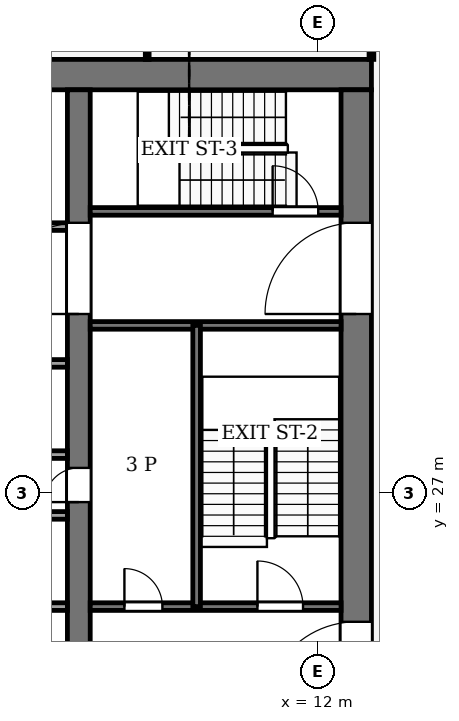
"""IFC4 building model, lengths in metres.
Left out: names, types, materials, properties, quantities, classifications, styles, units other than length and angle.
Written with IfcOpenShell. Run it as: python <this file> out.ifc"""

import sys

from ifc_helpers import new_model, si_unit, direction, frame, frame_2d, origin, place, context, subcontext, project, spatial, rectangle, extrude, element, fill, save


model = new_model("IFC4")
c1 = context("Model", 3, precision=1e-05, world=origin(), true_north=direction((0.0, 1.0)))
c2 = subcontext(c1, "Body", "Model", "MODEL_VIEW")
j1 = project(units=[si_unit("LENGTHUNIT", "METRE"), si_unit("PLANEANGLEUNIT", "RADIAN")], contexts=[c1])
p1 = place(None, origin())
s1 = spatial("IfcSite", under=j1, at=p1, CompositionType="ELEMENT")
p2 = place(p1, origin())
s2 = spatial("IfcBuilding", under=s1, at=p2, CompositionType="ELEMENT")
p3 = place(p2, frame((0.0, 0.0, 258.0)))
s3 = spatial("IfcBuildingStorey", under=s2, at=p3, CompositionType="ELEMENT", Elevation=258.0)
p4 = place(p3, frame((-13.4, 38.0, -0.13), z_axis=(0.0, 0.0, 1.0), x_axis=(1.0, 0.0, 0.0)))
e1 = element("IfcWall", 1, at=p4, inside=s3, PredefinedType="SHEAR", context=c2, shape_type="SweptSolid", body=[
    extrude(rectangle(XDim=26.8, YDim=0.8, at=frame_2d((13.4, 0.0))), origin(), (0.0, 0.0, 1.0), 4.0),
])
p5 = place(p3, frame((13.0, 18.4, -0.13), z_axis=(0.0, 0.0, 1.0), x_axis=(0.0, 1.0, 0.0)))
e2 = element("IfcWall", 2, at=p5, inside=s3, PredefinedType="SHEAR", context=c2, shape_type="SweptSolid", body=[
    extrude(rectangle(XDim=19.2, YDim=0.8, at=frame_2d((9.6, 0.0))), origin(), (0.0, 0.0, 1.0), 4.0),
])
p6 = place(p5, frame((2.8, 0.0, 0.13)))
e3 = element("IfcOpeningElement", 3, at=p6, cuts=e2, PredefinedType="OPENING", context=c2, shape_type="SweptSolid", body=[
    extrude(rectangle(XDim=2.4, YDim=2.4, at=frame_2d((1.2, 1.2))), frame((0.0, 0.41, 0.0), z_axis=(0.0, -1.0, 0.0), x_axis=(1.0, 0.0, 0.0)), (0.0, 0.0, 1.0), 0.82),
])
p7 = place(p5, frame((13.3, 0.0, 0.13)))
e4 = element("IfcOpeningElement", 4, at=p7, cuts=e2, PredefinedType="OPENING", context=c2, shape_type="SweptSolid", body=[
    extrude(rectangle(XDim=2.4, YDim=2.4, at=frame_2d((1.2, 1.2))), frame((0.0, 0.41, 0.0), z_axis=(0.0, -1.0, 0.0), x_axis=(1.0, 0.0, 0.0)), (0.0, 0.0, 1.0), 0.82),
])
p8 = place(p3, frame((5.7, 18.4, -0.13), z_axis=(0.0, 0.0, 1.0), x_axis=(0.0, 1.0, 0.0)))
e5 = element("IfcWall", 5, at=p8, inside=s3, PredefinedType="SHEAR", context=c2, shape_type="SweptSolid", body=[
    extrude(rectangle(XDim=19.2, YDim=0.6, at=frame_2d((9.6, 0.0))), origin(), (0.0, 0.0, 1.0), 4.0),
])
p9 = place(p8, frame((8.35, 0.0, 0.13)))
e6 = element("IfcOpeningElement", 6, at=p9, cuts=e5, PredefinedType="OPENING", context=c2, shape_type="SweptSolid", body=[
    extrude(rectangle(XDim=0.9, YDim=2.1, at=frame_2d((0.45, 1.05))), frame((0.0, 0.31, 0.0), z_axis=(0.0, -1.0, 0.0), x_axis=(1.0, 0.0, 0.0)), (0.0, 0.0, 1.0), 0.62),
])
p10 = place(p8, frame((13.3, 0.0, 0.13)))
e7 = element("IfcOpeningElement", 7, at=p10, cuts=e5, PredefinedType="OPENING", context=c2, shape_type="SweptSolid", body=[
    extrude(rectangle(XDim=2.4, YDim=2.4, at=frame_2d((1.2, 1.2))), frame((0.0, 0.31, 0.0), z_axis=(0.0, -1.0, 0.0), x_axis=(1.0, 0.0, 0.0)), (0.0, 0.0, 1.0), 0.62),
])
p11 = place(p3, frame((-5.4, 24.0, 0.0), z_axis=(0.0, 0.0, 1.0), x_axis=(1.0, 0.0, 0.0)))
e8 = element("IfcWall", 8, at=p11, inside=s3, PredefinedType="PARTITIONING", context=c2, shape_type="SweptSolid", body=[
    extrude(rectangle(XDim=10.8, YDim=0.2, at=frame_2d((5.4, 0.0))), origin(), (0.0, 0.0, 1.0), 3.87),
])
p12 = place(p11, frame((0.75, 0.0, 0.0)))
e9 = element("IfcOpeningElement", 9, at=p12, cuts=e8, PredefinedType="OPENING", context=c2, shape_type="SweptSolid", body=[
    extrude(rectangle(XDim=1.2, YDim=2.2, at=frame_2d((0.6, 1.1))), frame((0.0, 0.11, 0.0), z_axis=(0.0, -1.0, 0.0), x_axis=(1.0, 0.0, 0.0)), (0.0, 0.0, 1.0), 0.22),
])
p13 = place(p11, frame((3.45, 0.0, 0.0)))
e10 = element("IfcOpeningElement", 10, at=p13, cuts=e8, PredefinedType="OPENING", context=c2, shape_type="SweptSolid", body=[
    extrude(rectangle(XDim=1.2, YDim=2.2, at=frame_2d((0.6, 1.1))), frame((0.0, 0.11, 0.0), z_axis=(0.0, -1.0, 0.0), x_axis=(1.0, 0.0, 0.0)), (0.0, 0.0, 1.0), 0.22),
])
p14 = place(p11, frame((6.15, 0.0, 0.0)))
e11 = element("IfcOpeningElement", 11, at=p14, cuts=e8, PredefinedType="OPENING", context=c2, shape_type="SweptSolid", body=[
    extrude(rectangle(XDim=1.2, YDim=2.2, at=frame_2d((0.6, 1.1))), frame((0.0, 0.11, 0.0), z_axis=(0.0, -1.0, 0.0), x_axis=(1.0, 0.0, 0.0)), (0.0, 0.0, 1.0), 0.22),
])
p15 = place(p11, frame((8.85, 0.0, 0.0)))
e12 = element("IfcOpeningElement", 12, at=p15, cuts=e8, PredefinedType="OPENING", context=c2, shape_type="SweptSolid", body=[
    extrude(rectangle(XDim=1.2, YDim=2.2, at=frame_2d((0.6, 1.1))), frame((0.0, 0.11, 0.0), z_axis=(0.0, -1.0, 0.0), x_axis=(1.0, 0.0, 0.0)), (0.0, 0.0, 1.0), 0.22),
])
p16 = place(p3, frame((6.0, 24.0, 0.0), z_axis=(0.0, 0.0, 1.0), x_axis=(1.0, 0.0, 0.0)))
e13 = element("IfcWall", 13, at=p16, inside=s3, PredefinedType="PARTITIONING", context=c2, shape_type="SweptSolid", body=[
    extrude(rectangle(XDim=6.6, YDim=0.2, at=frame_2d((3.3, 0.0))), origin(), (0.0, 0.0, 1.0), 3.87),
])
p17 = place(p16, frame((0.9, 0.0, 0.0)))
e14 = element("IfcOpeningElement", 14, at=p17, cuts=e13, PredefinedType="OPENING", context=c2, shape_type="SweptSolid", body=[
    extrude(rectangle(XDim=1.0, YDim=2.1, at=frame_2d((0.5, 1.05))), frame((0.0, 0.11, 0.0), z_axis=(0.0, -1.0, 0.0), x_axis=(1.0, 0.0, 0.0)), (0.0, 0.0, 1.0), 0.22),
])
p18 = place(p16, frame((4.4, 0.0, 0.0)))
e15 = element("IfcOpeningElement", 15, at=p18, cuts=e13, PredefinedType="OPENING", context=c2, shape_type="SweptSolid", body=[
    extrude(rectangle(XDim=1.2, YDim=2.2, at=frame_2d((0.6, 1.1))), frame((0.0, 0.11, 0.0), z_axis=(0.0, -1.0, 0.0), x_axis=(1.0, 0.0, 0.0)), (0.0, 0.0, 1.0), 0.22),
])
for number, where, z_axis, x_axis in (
    (16, (-5.4, 26.4, 0.0), (0.0, 0.0, 1.0), (1.0, 0.0, 0.0)),
    (17, (-5.4, 28.0, 0.0), (0.0, 0.0, 1.0), (1.0, 0.0, 0.0)),
):
    element("IfcWall", number, at=place(p3, frame(where, z_axis=z_axis, x_axis=x_axis)), inside=s3, PredefinedType="PARTITIONING", context=c2, shape_type="SweptSolid", body=[
        extrude(rectangle(XDim=10.8, YDim=0.2, at=frame_2d((5.4, 0.0))), origin(), (0.0, 0.0, 1.0), 3.87),
    ])
p19 = place(p3, frame((-5.4, 30.4, 0.0), z_axis=(0.0, 0.0, 1.0), x_axis=(1.0, 0.0, 0.0)))
e18 = element("IfcWall", 18, at=p19, inside=s3, PredefinedType="PARTITIONING", context=c2, shape_type="SweptSolid", body=[
    extrude(rectangle(XDim=10.8, YDim=0.2, at=frame_2d((5.4, 0.0))), origin(), (0.0, 0.0, 1.0), 3.87),
])
p20 = place(p19, frame((3.064, 0.0, 0.0)))
e19 = element("IfcOpeningElement", 19, at=p20, cuts=e18, PredefinedType="OPENING", context=c2, shape_type="SweptSolid", body=[
    extrude(rectangle(XDim=1.0, YDim=2.1, at=frame_2d((0.5, 1.05))), frame((0.0, 0.11, 0.0), z_axis=(0.0, -1.0, 0.0), x_axis=(1.0, 0.0, 0.0)), (0.0, 0.0, 1.0), 0.22),
])
p21 = place(p19, frame((8.464, 0.0, 0.0)))
e20 = element("IfcOpeningElement", 20, at=p21, cuts=e18, PredefinedType="OPENING", context=c2, shape_type="SweptSolid", body=[
    extrude(rectangle(XDim=1.0, YDim=2.1, at=frame_2d((0.5, 1.05))), frame((0.0, 0.11, 0.0), z_axis=(0.0, -1.0, 0.0), x_axis=(1.0, 0.0, 0.0)), (0.0, 0.0, 1.0), 0.22),
])
p22 = place(p3, frame((6.0, 31.4, 0.0), z_axis=(0.0, 0.0, 1.0), x_axis=(1.0, 0.0, 0.0)))
e21 = element("IfcWall", 21, at=p22, inside=s3, PredefinedType="PARTITIONING", context=c2, shape_type="SweptSolid", body=[
    extrude(rectangle(XDim=6.6, YDim=0.2, at=frame_2d((3.3, 0.0))), origin(), (0.0, 0.0, 1.0), 3.87),
])
p23 = place(p3, frame((-5.4, 34.0, 0.0), z_axis=(0.0, 0.0, 1.0), x_axis=(1.0, 0.0, 0.0)))
e22 = element("IfcWall", 22, at=p23, inside=s3, PredefinedType="PARTITIONING", context=c2, shape_type="SweptSolid", body=[
    extrude(rectangle(XDim=10.8, YDim=0.2, at=frame_2d((5.4, 0.0))), origin(), (0.0, 0.0, 1.0), 3.87),
])
p24 = place(p23, frame((6.15, 0.0, 0.0)))
e23 = element("IfcOpeningElement", 23, at=p24, cuts=e22, PredefinedType="OPENING", context=c2, shape_type="SweptSolid", body=[
    extrude(rectangle(XDim=1.2, YDim=2.2, at=frame_2d((0.6, 1.1))), frame((0.0, 0.11, 0.0), z_axis=(0.0, -1.0, 0.0), x_axis=(1.0, 0.0, 0.0)), (0.0, 0.0, 1.0), 0.22),
])
p25 = place(p23, frame((8.95, 0.0, 0.0)))
e24 = element("IfcOpeningElement", 24, at=p25, cuts=e22, PredefinedType="OPENING", context=c2, shape_type="SweptSolid", body=[
    extrude(rectangle(XDim=1.0, YDim=2.1, at=frame_2d((0.5, 1.05))), frame((0.0, 0.11, 0.0), z_axis=(0.0, -1.0, 0.0), x_axis=(1.0, 0.0, 0.0)), (0.0, 0.0, 1.0), 0.22),
])
p26 = place(p3, frame((6.0, 34.4, 0.0), z_axis=(0.0, 0.0, 1.0), x_axis=(1.0, 0.0, 0.0)))
e25 = element("IfcWall", 25, at=p26, inside=s3, PredefinedType="PARTITIONING", context=c2, shape_type="SweptSolid", body=[
    extrude(rectangle(XDim=6.6, YDim=0.2, at=frame_2d((3.3, 0.0))), origin(), (0.0, 0.0, 1.0), 3.87),
])
p27 = place(p26, frame((4.8, 0.0, 0.0)))
e26 = element("IfcOpeningElement", 26, at=p27, cuts=e25, PredefinedType="OPENING", context=c2, shape_type="SweptSolid", body=[
    extrude(rectangle(XDim=1.2, YDim=2.2, at=frame_2d((0.6, 1.1))), frame((0.0, 0.11, 0.0), z_axis=(0.0, -1.0, 0.0), x_axis=(1.0, 0.0, 0.0)), (0.0, 0.0, 1.0), 0.22),
])
p28 = place(p3, frame((8.8, 24.0, 0.0), z_axis=(0.0, 0.0, 1.0), x_axis=(0.0, 1.0, 0.0)))
e27 = element("IfcWall", 27, at=p28, inside=s3, PredefinedType="PARTITIONING", context=c2, shape_type="SweptSolid", body=[
    extrude(rectangle(XDim=7.4, YDim=0.2, at=frame_2d((3.7, 0.0))), origin(), (0.0, 0.0, 1.0), 3.87),
])
p29 = place(p3, frame((13.4, 38.4, 0.0), z_axis=(0.0, 0.0, 1.0), x_axis=(0.0, 1.0, 0.0)))
e28 = element("IfcWall", 28, at=p29, inside=s3, PredefinedType="PARTITIONING", context=c2, shape_type="SweptSolid", body=[
    extrude(rectangle(XDim=5.1, YDim=0.125, at=frame_2d((2.55, 0.0))), origin(), (0.0, 0.0, 1.0), 3.14),
])
p30 = place(p29, frame((2.05, 0.0, 0.0)))
e29 = element("IfcOpeningElement", 29, at=p30, cuts=e28, PredefinedType="OPENING", context=c2, shape_type="SweptSolid", body=[
    extrude(rectangle(XDim=1.0, YDim=2.1, at=frame_2d((0.5, 1.05))), frame((0.0, 0.073, 0.0), z_axis=(0.0, -1.0, 0.0), x_axis=(1.0, 0.0, 0.0)), (0.0, 0.0, 1.0), 0.145),
])
p31 = place(p3, frame((7.5, 43.504, 0.0), z_axis=(0.0, 0.0, 1.0), x_axis=(0.0, -1.0, 0.0)))
e30 = element("IfcWall", 30, at=p31, inside=s3, PredefinedType="PARTITIONING", context=c2, shape_type="SweptSolid", body=[
    extrude(rectangle(XDim=5.104, YDim=0.1, at=frame_2d((2.552, 0.0))), origin(), (0.0, 0.0, 1.0), 3.87),
])
p32 = place(p17, origin())
e31 = element("IfcDoor", 31, at=p32, inside=s3, OperationType="SINGLE_SWING_RIGHT", PredefinedType="DOOR", context=c2, shape_type="SweptSolid", body=[
    extrude(rectangle(XDim=1.0, YDim=2.1, at=frame_2d((0.5, 1.05))), frame((0.0, 0.025, 0.0), z_axis=(0.0, -1.0, 0.0), x_axis=(1.0, 0.0, 0.0)), (0.0, 0.0, 1.0), 0.05),
])
fill(e14, e31)
p33 = place(p9, origin())
e32 = element("IfcDoor", 32, at=p33, inside=s3, OperationType="SINGLE_SWING_RIGHT", PredefinedType="DOOR", context=c2, shape_type="SweptSolid", body=[
    extrude(rectangle(XDim=0.9, YDim=2.1, at=frame_2d((0.45, 1.05))), frame((0.0, 0.025, 0.0), z_axis=(0.0, -1.0, 0.0), x_axis=(1.0, 0.0, 0.0)), (0.0, 0.0, 1.0), 0.05),
])
fill(e6, e32)
p34 = place(p18, origin())
e33 = element("IfcDoor", 33, at=p34, inside=s3, OperationType="SINGLE_SWING_LEFT", PredefinedType="DOOR", context=c2, shape_type="SweptSolid", body=[
    extrude(rectangle(XDim=1.2, YDim=2.2, at=frame_2d((0.6, 1.1))), frame((0.0, 0.025, 0.0), z_axis=(0.0, -1.0, 0.0), x_axis=(1.0, 0.0, 0.0)), (0.0, 0.0, 1.0), 0.05),
])
fill(e15, e33)
p35 = place(p27, origin())
e34 = element("IfcDoor", 34, at=p35, inside=s3, OperationType="SINGLE_SWING_RIGHT", PredefinedType="DOOR", context=c2, shape_type="SweptSolid", body=[
    extrude(rectangle(XDim=1.2, YDim=2.2, at=frame_2d((0.6, 1.1))), frame((0.0, 0.025, 0.0), z_axis=(0.0, -1.0, 0.0), x_axis=(1.0, 0.0, 0.0)), (0.0, 0.0, 1.0), 0.05),
])
fill(e26, e34)
p36 = place(p10, origin())
e35 = element("IfcDoor", 35, at=p36, inside=s3, OperationType="DOUBLE_DOOR_SINGLE_SWING", PredefinedType="DOOR", context=c2, shape_type="SweptSolid", body=[
    extrude(rectangle(XDim=2.4, YDim=2.4, at=frame_2d((1.2, 1.2))), frame((0.0, 0.025, 0.0), z_axis=(0.0, -1.0, 0.0), x_axis=(1.0, 0.0, 0.0)), (0.0, 0.0, 1.0), 0.05),
])
fill(e7, e35)
p37 = place(p6, origin())
e36 = element("IfcDoor", 36, at=p37, inside=s3, OperationType="DOUBLE_DOOR_SINGLE_SWING", PredefinedType="DOOR", context=c2, shape_type="SweptSolid", body=[
    extrude(rectangle(XDim=2.4, YDim=2.4, at=frame_2d((1.2, 1.2))), frame((0.0, 0.025, 0.0), z_axis=(0.0, -1.0, 0.0), x_axis=(1.0, 0.0, 0.0)), (0.0, 0.0, 1.0), 0.05),
])
fill(e3, e36)
p38 = place(p7, origin())
e37 = element("IfcDoor", 37, at=p38, inside=s3, OperationType="DOUBLE_DOOR_SINGLE_SWING", PredefinedType="DOOR", context=c2, shape_type="SweptSolid", body=[
    extrude(rectangle(XDim=2.4, YDim=2.4, at=frame_2d((1.2, 1.2))), frame((0.0, 0.025, 0.0), z_axis=(0.0, -1.0, 0.0), x_axis=(1.0, 0.0, 0.0)), (0.0, 0.0, 1.0), 0.05),
])
fill(e4, e37)
save(model, sys.argv[1])
